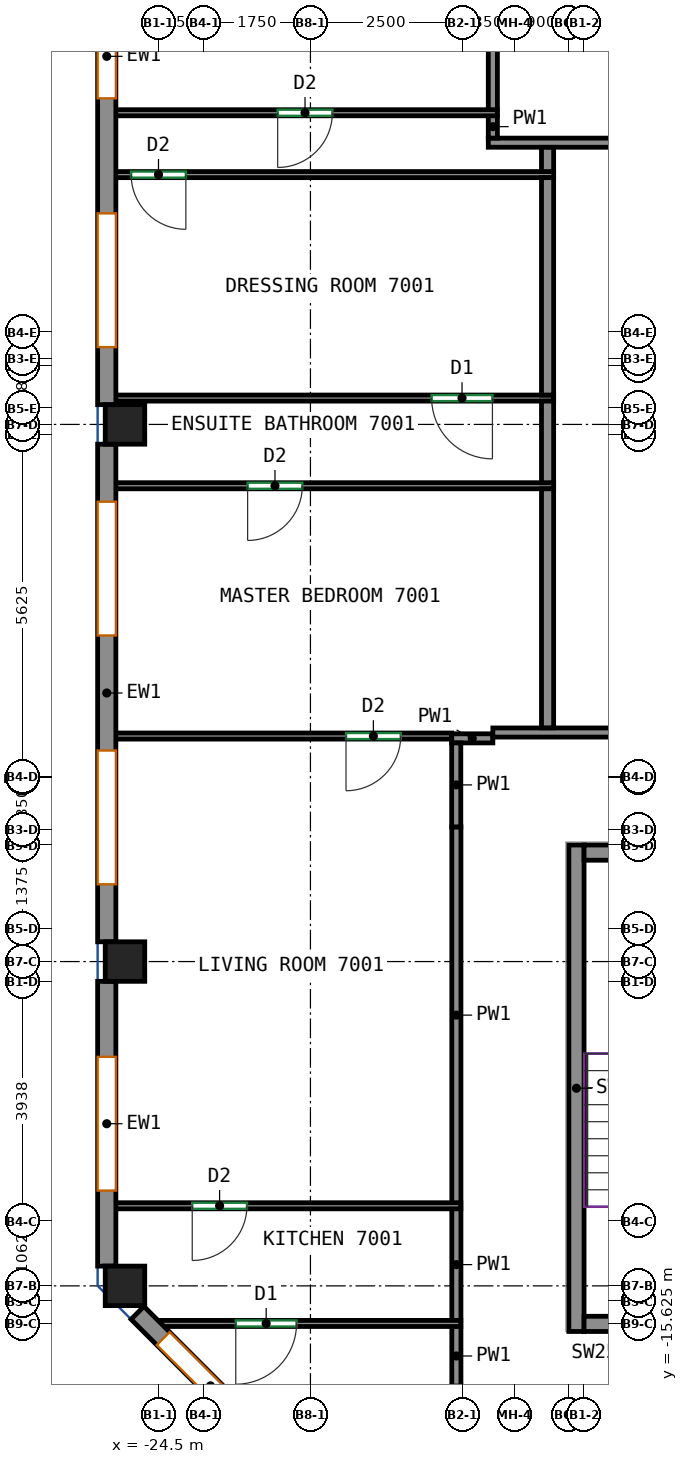
"""IFC4 building model, lengths in metres.
Left out: names, types, materials, properties, quantities, classifications, styles, units other than length and angle.
Written with IfcOpenShell. Run it as: python <this file> out.ifc"""

import sys

from ifc_helpers import new_model, si_unit, direction, frame, frame_2d, origin, origin_2d, place, context, subcontext, project, spatial, rectangle, extrude, source, transform, mapped, element, fill, save


model = new_model("IFC4")
c1 = context("Model", 3, precision=1e-05, world=origin(), true_north=direction((0.0, 1.0)))
c2 = subcontext(c1, "Body", "Model", "MODEL_VIEW")
j1 = project(units=[si_unit("LENGTHUNIT", "METRE"), si_unit("PLANEANGLEUNIT", "RADIAN")], contexts=[c1])
p1 = place(None, origin())
s1 = spatial("IfcSite", under=j1, at=p1, CompositionType="ELEMENT")
p2 = place(p1, origin())
s2 = spatial("IfcBuilding", under=s1, at=p2, CompositionType="ELEMENT")
p3 = place(p2, frame((0.0, 0.0, 284.0)))
s3 = spatial("IfcBuildingStorey", under=s2, at=p3, CompositionType="ELEMENT", Elevation=284.0)
m1 = source(origin(), c2, "Body", "SweptSolid", [
    extrude(rectangle(XDim=0.65, YDim=0.65, at=origin_2d()), origin(), (0.0, 0.0, 1.0), 3.12),
])
for number, where, z_axis, x_axis in (
    (1, (-25.05, -15.0, 0.0), (0.0, 0.0, 1.0), (1.0, 0.0, 0.0)),
    (2, (-25.05, -9.667, 0.0), (0.0, 0.0, 1.0), (1.0, 0.0, 0.0)),
    (3, (-25.05, -0.833, 0.0), (0.0, 0.0, 1.0), (1.0, 0.0, 0.0)),
):
    element("IfcColumn", number, at=place(p3, frame(where, z_axis=z_axis, x_axis=x_axis)), inside=s3, PredefinedType="COLUMN", context=c2, shape_type="MappedRepresentation", body=[
        mapped(m1, transform((0.0, 0.0, 0.0))),
    ])
m2 = source(origin(), c2, "Body", "SweptSolid", [
    extrude(rectangle(XDim=8.0, YDim=0.25, at=frame_2d((4.0, 0.0))), origin(), (0.0, 0.0, 1.0), 3.12),
])
p4 = place(p3, frame((-17.625, -15.75, 0.0), z_axis=(0.0, 0.0, 1.0), x_axis=(0.0, 1.0, 0.0)))
e4 = element("IfcWall", 4, at=p4, inside=s3, PredefinedType="SHEAR", context=c2, shape_type="MappedRepresentation", body=[
    mapped(m2, transform((0.0, 0.0, 0.0))),
])
m3 = source(origin(), c2, "Body", "SweptSolid", [
    extrude(rectangle(XDim=3.7, YDim=0.25, at=frame_2d((1.85, 0.0))), origin(), (0.0, 0.0, 1.0), 3.12),
])
p5 = place(p3, frame((-17.5, -15.625, 0.0), z_axis=(0.0, 0.0, 1.0), x_axis=(1.0, 0.0, 0.0)))
e5 = element("IfcWall", 5, at=p5, inside=s3, PredefinedType="SHEAR", context=c2, shape_type="MappedRepresentation", body=[
    mapped(m3, transform((0.0, 0.0, 0.0))),
])
p6 = place(p5, frame((1.25, 0.0, 0.0)))
e6 = element("IfcOpeningElement", 6, at=p6, cuts=e5, PredefinedType="OPENING", context=c2, shape_type="SweptSolid", body=[
    extrude(rectangle(XDim=1.2, YDim=2.1, at=frame_2d((0.6, 1.05))), frame((0.0, 0.135, 0.0), z_axis=(0.0, -1.0, 0.0), x_axis=(1.0, 0.0, 0.0)), (0.0, 0.0, 1.0), 0.27),
])
p7 = place(p3, frame((-17.5, -7.875, 0.0), z_axis=(0.0, 0.0, 1.0), x_axis=(1.0, 0.0, 0.0)))
e7 = element("IfcWall", 7, at=p7, inside=s3, PredefinedType="SHEAR", context=c2, shape_type="MappedRepresentation", body=[
    mapped(m3, transform((0.0, 0.0, 0.0))),
])
m4 = source(origin(), c2, "Body", "SweptSolid", [
    extrude(rectangle(XDim=8.183, YDim=0.3, at=frame_2d((4.092, 0.0))), origin(), (0.0, 0.0, 1.0), 3.12),
])
p8 = place(p3, frame((-25.35, 7.675, 0.0), z_axis=(0.0, 0.0, 1.0), x_axis=(0.0, -1.0, 0.0)))
e8 = element("IfcWall", 8, at=p8, inside=s3, PredefinedType="SOLIDWALL", context=c2, shape_type="MappedRepresentation", body=[
    mapped(m4, transform((0.0, 0.0, 0.0))),
])
p9 = place(p8, frame((0.946, 0.0, 0.8)))
e9 = element("IfcOpeningElement", 9, at=p9, cuts=e8, PredefinedType="OPENING", context=c2, shape_type="SweptSolid", body=[
    extrude(rectangle(XDim=2.2, YDim=2.05, at=frame_2d((1.1, 1.025))), frame((0.0, 0.16, 0.0), z_axis=(0.0, -1.0, 0.0), x_axis=(1.0, 0.0, 0.0)), (0.0, 0.0, 1.0), 0.32),
])
p10 = place(p8, frame((5.037, 0.0, 0.8)))
e10 = element("IfcOpeningElement", 10, at=p10, cuts=e8, PredefinedType="OPENING", context=c2, shape_type="SweptSolid", body=[
    extrude(rectangle(XDim=2.2, YDim=2.05, at=frame_2d((1.1, 1.025))), frame((0.0, 0.16, 0.0), z_axis=(0.0, -1.0, 0.0), x_axis=(1.0, 0.0, 0.0)), (0.0, 0.0, 1.0), 0.32),
])
m5 = source(origin(), c2, "Body", "SweptSolid", [
    extrude(rectangle(XDim=8.184, YDim=0.3, at=frame_2d((4.092, 0.0))), origin(), (0.0, 0.0, 1.0), 3.12),
])
p11 = place(p3, frame((-25.35, -1.158, 0.0), z_axis=(0.0, 0.0, 1.0), x_axis=(0.0, -1.0, 0.0)))
e11 = element("IfcWall", 11, at=p11, inside=s3, PredefinedType="SOLIDWALL", context=c2, shape_type="MappedRepresentation", body=[
    mapped(m5, transform((0.0, 0.0, 0.0))),
])
p12 = place(p11, frame((0.946, 0.0, 0.8)))
e12 = element("IfcOpeningElement", 12, at=p12, cuts=e11, PredefinedType="OPENING", context=c2, shape_type="SweptSolid", body=[
    extrude(rectangle(XDim=2.2, YDim=2.05, at=frame_2d((1.1, 1.025))), frame((0.0, 0.16, 0.0), z_axis=(0.0, -1.0, 0.0), x_axis=(1.0, 0.0, 0.0)), (0.0, 0.0, 1.0), 0.32),
])
p13 = place(p11, frame((5.038, 0.0, 0.8)))
e13 = element("IfcOpeningElement", 13, at=p13, cuts=e11, PredefinedType="OPENING", context=c2, shape_type="SweptSolid", body=[
    extrude(rectangle(XDim=2.2, YDim=2.05, at=frame_2d((1.1, 1.025))), frame((0.0, 0.16, 0.0), z_axis=(0.0, -1.0, 0.0), x_axis=(1.0, 0.0, 0.0)), (0.0, 0.0, 1.0), 0.32),
])
m6 = source(origin(), c2, "Body", "SweptSolid", [
    extrude(rectangle(XDim=4.683, YDim=0.3, at=frame_2d((2.342, 0.0))), origin(), (0.0, 0.0, 1.0), 3.12),
])
p14 = place(p3, frame((-25.35, -9.992, 0.0), z_axis=(0.0, 0.0, 1.0), x_axis=(0.0, -1.0, 0.0)))
e14 = element("IfcWall", 14, at=p14, inside=s3, PredefinedType="SOLIDWALL", context=c2, shape_type="MappedRepresentation", body=[
    mapped(m6, transform((0.0, 0.0, 0.0))),
])
p15 = place(p14, frame((1.242, 0.0, 0.8)))
e15 = element("IfcOpeningElement", 15, at=p15, cuts=e14, PredefinedType="OPENING", context=c2, shape_type="SweptSolid", body=[
    extrude(rectangle(XDim=2.2, YDim=2.05, at=frame_2d((1.1, 1.025))), frame((0.0, 0.16, 0.0), z_axis=(0.0, -1.0, 0.0), x_axis=(1.0, 0.0, 0.0)), (0.0, 0.0, 1.0), 0.32),
])
m7 = source(origin(), c2, "Body", "SweptSolid", [
    extrude(rectangle(XDim=3.394, YDim=0.3, at=frame_2d((1.697, 0.0))), origin(), (0.0, 0.0, 1.0), 3.12),
])
p16 = place(p3, frame((-24.844, -15.444, 0.0), z_axis=(0.0, 0.0, 1.0), x_axis=(0.707070815327, -0.707142745217, 0.0)))
e16 = element("IfcWall", 16, at=p16, inside=s3, PredefinedType="SOLIDWALL", context=c2, shape_type="MappedRepresentation", body=[
    mapped(m7, transform((0.0, 0.0, 0.0))),
])
p17 = place(p16, frame((0.597, 0.0, 0.8)))
e17 = element("IfcOpeningElement", 17, at=p17, cuts=e16, PredefinedType="OPENING", context=c2, shape_type="SweptSolid", body=[
    extrude(rectangle(XDim=2.2, YDim=2.05, at=frame_2d((1.1, 1.025))), frame((0.0, 0.16, 0.0), z_axis=(0.0, -1.0, 0.0), x_axis=(1.0, 0.0, 0.0)), (0.0, 0.0, 1.0), 0.32),
])
p18 = place(p3, frame((-19.6, -16.648, 0.0), z_axis=(0.0, 0.0, 1.0), x_axis=(0.0, 1.0, 0.0)))
e18 = element("IfcWall", 18, at=p18, inside=s3, PredefinedType="PARTITIONING", context=c2, shape_type="SweptSolid", body=[
    extrude(rectangle(XDim=0.99, YDim=0.15, at=frame_2d((0.495, 0.0))), origin(), (0.0, 0.0, 1.0), 3.12),
])
p19 = place(p3, frame((-19.6, -15.578, 0.0), z_axis=(0.0, 0.0, 1.0), x_axis=(0.0, 1.0, 0.0)))
e19 = element("IfcWall", 19, at=p19, inside=s3, PredefinedType="PARTITIONING", context=c2, shape_type="SweptSolid", body=[
    extrude(rectangle(XDim=1.855, YDim=0.15, at=frame_2d((0.927, 0.0))), origin(), (0.0, 0.0, 1.0), 3.12),
])
p20 = place(p3, frame((-19.0, -5.996, 0.0), z_axis=(0.0, 0.0, 1.0), x_axis=(-1.0, 0.0, 0.0)))
e20 = element("IfcWall", 20, at=p20, inside=s3, PredefinedType="PARTITIONING", context=c2, shape_type="SweptSolid", body=[
    extrude(rectangle(XDim=0.677, YDim=0.15, at=frame_2d((0.338, 0.0))), origin(), (0.0, 0.0, 1.0), 3.12),
])
p21 = place(p3, frame((-19.6, -13.643, 0.0), z_axis=(0.0, 0.0, 1.0), x_axis=(0.0, 1.0, 0.0)))
e21 = element("IfcWall", 21, at=p21, inside=s3, PredefinedType="PARTITIONING", context=c2, shape_type="SweptSolid", body=[
    extrude(rectangle(XDim=6.191, YDim=0.15, at=frame_2d((3.096, 0.0))), origin(), (0.0, 0.0, 1.0), 3.12),
])
p22 = place(p3, frame((-19.602, -7.452, 0.0), z_axis=(0.0, 0.0, 1.0), x_axis=(0.0, 1.0, 0.0)))
e22 = element("IfcWall", 22, at=p22, inside=s3, PredefinedType="PARTITIONING", context=c2, shape_type="SweptSolid", body=[
    extrude(rectangle(XDim=1.381, YDim=0.15, at=frame_2d((0.69, 0.0))), origin(), (0.0, 0.0, 1.0), 3.12),
])
p23 = place(p3, frame((-19.0, -5.9, 0.0), z_axis=(0.0, 0.0, 1.0), x_axis=(1.0, 0.0, 0.0)))
e23 = element("IfcWall", 23, at=p23, inside=s3, PredefinedType="PARTITIONING", context=c2, shape_type="SweptSolid", body=[
    extrude(rectangle(XDim=25.655, YDim=0.15, at=frame_2d((12.828, 0.0))), origin(), (0.0, 0.0, 1.0), 3.12),
])
p24 = place(p23, frame((4.394, 0.0, 0.0)))
e24 = element("IfcOpeningElement", 24, at=p24, cuts=e23, PredefinedType="OPENING", context=c2, shape_type="SweptSolid", body=[
    extrude(rectangle(XDim=0.9, YDim=2.1, at=frame_2d((0.45, 1.05))), frame((0.0, 0.085, 0.0), z_axis=(0.0, -1.0, 0.0), x_axis=(1.0, 0.0, 0.0)), (0.0, 0.0, 1.0), 0.17),
])
p25 = place(p3, frame((-19.075, 3.8, 0.0), z_axis=(0.0, 0.0, 1.0), x_axis=(1.0, 0.0, 0.0)))
e25 = element("IfcWall", 25, at=p25, inside=s3, PredefinedType="PARTITIONING", context=c2, shape_type="SweptSolid", body=[
    extrude(rectangle(XDim=4.89, YDim=0.15, at=frame_2d((2.445, 0.0))), origin(), (0.0, 0.0, 1.0), 3.12),
])
p26 = place(p3, frame((-19.0, 3.875, 0.0), z_axis=(0.0, 0.0, 1.0), x_axis=(0.0, 1.0, 0.0)))
e26 = element("IfcWall", 26, at=p26, inside=s3, PredefinedType="PARTITIONING", context=c2, shape_type="SweptSolid", body=[
    extrude(rectangle(XDim=0.377, YDim=0.15, at=frame_2d((0.188, 0.0))), origin(), (0.0, 0.0, 1.0), 3.12),
])
p27 = place(p3, frame((-19.0, 4.332, 0.0), z_axis=(0.0, 0.0, 1.0), x_axis=(0.0, 1.0, 0.0)))
e27 = element("IfcWall", 27, at=p27, inside=s3, PredefinedType="PARTITIONING", context=c2, shape_type="SweptSolid", body=[
    extrude(rectangle(XDim=3.578, YDim=0.15, at=frame_2d((1.789, 0.0))), origin(), (0.0, 0.0, 1.0), 3.12),
])
p28 = place(p3, frame((-19.527, -15.618, 0.0), z_axis=(0.0, 0.0, 1.0), x_axis=(-1.0, 0.0, 0.0)))
e28 = element("IfcWall", 28, at=p28, inside=s3, PredefinedType="PARTITIONING", context=c2, shape_type="SweptSolid", body=[
    extrude(rectangle(XDim=5.001, YDim=0.1, at=frame_2d((2.5, 0.0))), origin(), (0.0, 0.0, 1.0), 3.12),
])
p29 = place(p28, frame((2.701, 0.0, 0.0)))
e29 = element("IfcOpeningElement", 29, at=p29, cuts=e28, PredefinedType="OPENING", context=c2, shape_type="SweptSolid", body=[
    extrude(rectangle(XDim=1.0, YDim=2.1, at=frame_2d((0.5, 1.05))), frame((0.0, 0.06, 0.0), z_axis=(0.0, -1.0, 0.0), x_axis=(1.0, 0.0, 0.0)), (0.0, 0.0, 1.0), 0.12),
])
p30 = place(p3, frame((-19.527, -13.683, 0.0), z_axis=(0.0, 0.0, 1.0), x_axis=(-1.0, 0.0, 0.0)))
e30 = element("IfcWall", 30, at=p30, inside=s3, PredefinedType="PARTITIONING", context=c2, shape_type="SweptSolid", body=[
    extrude(rectangle(XDim=5.723, YDim=0.1, at=frame_2d((2.861, 0.0))), origin(), (0.0, 0.0, 1.0), 3.12),
])
p31 = place(p30, frame((3.517, 0.0, 0.0)))
e31 = element("IfcOpeningElement", 31, at=p31, cuts=e30, PredefinedType="OPENING", context=c2, shape_type="SweptSolid", body=[
    extrude(rectangle(XDim=0.9, YDim=2.1, at=frame_2d((0.45, 1.05))), frame((0.0, 0.06, 0.0), z_axis=(0.0, -1.0, 0.0), x_axis=(1.0, 0.0, 0.0)), (0.0, 0.0, 1.0), 0.12),
])
p32 = place(p3, frame((-19.677, -5.958, 0.0), z_axis=(0.0, 0.0, 1.0), x_axis=(-1.0, 0.0, 0.0)))
e32 = element("IfcWall", 32, at=p32, inside=s3, PredefinedType="PARTITIONING", context=c2, shape_type="SweptSolid", body=[
    extrude(rectangle(XDim=5.573, YDim=0.1, at=frame_2d((2.787, 0.0))), origin(), (0.0, 0.0, 1.0), 3.12),
])
p33 = place(p32, frame((0.838, 0.0, 0.0)))
e33 = element("IfcOpeningElement", 33, at=p33, cuts=e32, PredefinedType="OPENING", context=c2, shape_type="SweptSolid", body=[
    extrude(rectangle(XDim=0.9, YDim=2.1, at=frame_2d((0.45, 1.05))), frame((0.0, 0.06, 0.0), z_axis=(0.0, -1.0, 0.0), x_axis=(1.0, 0.0, 0.0)), (0.0, 0.0, 1.0), 0.12),
])
p34 = place(p3, frame((-18.0, -1.842, 0.0), z_axis=(0.0, 0.0, 1.0), x_axis=(-1.0, 0.0, 0.0)))
e34 = element("IfcWall", 34, at=p34, inside=s3, PredefinedType="PARTITIONING", context=c2, shape_type="SweptSolid", body=[
    extrude(rectangle(XDim=7.25, YDim=0.1, at=frame_2d((3.625, 0.0))), origin(), (0.0, 0.0, 1.0), 3.12),
])
p35 = place(p34, frame((4.133, 0.0, 0.0)))
e35 = element("IfcOpeningElement", 35, at=p35, cuts=e34, PredefinedType="OPENING", context=c2, shape_type="SweptSolid", body=[
    extrude(rectangle(XDim=0.9, YDim=2.1, at=frame_2d((0.45, 1.05))), frame((0.0, 0.06, 0.0), z_axis=(0.0, -1.0, 0.0), x_axis=(1.0, 0.0, 0.0)), (0.0, 0.0, 1.0), 0.12),
])
p36 = place(p3, frame((-18.1, -5.823, 0.0), z_axis=(0.0, 0.0, 1.0), x_axis=(0.0, 1.0, 0.0)))
e36 = element("IfcWall", 36, at=p36, inside=s3, PredefinedType="PARTITIONING", context=c2, shape_type="SweptSolid", body=[
    extrude(rectangle(XDim=3.931, YDim=0.2, at=frame_2d((1.965, 0.0))), origin(), (0.0, 0.0, 1.0), 3.12),
])
p37 = place(p3, frame((-18.0, -0.4, 0.0), z_axis=(0.0, 0.0, 1.0), x_axis=(-1.0, 0.0, 0.0)))
e37 = element("IfcWall", 37, at=p37, inside=s3, PredefinedType="PARTITIONING", context=c2, shape_type="SweptSolid", body=[
    extrude(rectangle(XDim=7.25, YDim=0.1, at=frame_2d((3.625, 0.0))), origin(), (0.0, 0.0, 1.0), 3.12),
])
p38 = place(p37, frame((1.007, 0.0, 0.0)))
e38 = element("IfcOpeningElement", 38, at=p38, cuts=e37, PredefinedType="OPENING", context=c2, shape_type="SweptSolid", body=[
    extrude(rectangle(XDim=1.0, YDim=2.1, at=frame_2d((0.5, 1.05))), frame((0.0, 0.06, 0.0), z_axis=(0.0, -1.0, 0.0), x_axis=(1.0, 0.0, 0.0)), (0.0, 0.0, 1.0), 0.12),
])
p39 = place(p3, frame((-18.1, -1.792, 0.0), z_axis=(0.0, 0.0, 1.0), x_axis=(0.0, 1.0, 0.0)))
e39 = element("IfcWall", 39, at=p39, inside=s3, PredefinedType="PARTITIONING", context=c2, shape_type="SweptSolid", body=[
    extrude(rectangle(XDim=1.342, YDim=0.2, at=frame_2d((0.671, 0.0))), origin(), (0.0, 0.0, 1.0), 3.12),
])
p40 = place(p3, frame((-18.0, 3.275, 0.0), z_axis=(0.0, 0.0, 1.0), x_axis=(-1.0, 0.0, 0.0)))
e40 = element("IfcWall", 40, at=p40, inside=s3, PredefinedType="PARTITIONING", context=c2, shape_type="SweptSolid", body=[
    extrude(rectangle(XDim=7.25, YDim=0.1, at=frame_2d((3.625, 0.0))), origin(), (0.0, 0.0, 1.0), 3.12),
])
p41 = place(p40, frame((6.049, 0.0, 0.0)))
e41 = element("IfcOpeningElement", 41, at=p41, cuts=e40, PredefinedType="OPENING", context=c2, shape_type="SweptSolid", body=[
    extrude(rectangle(XDim=0.9, YDim=2.1, at=frame_2d((0.45, 1.05))), frame((0.0, 0.06, 0.0), z_axis=(0.0, -1.0, 0.0), x_axis=(1.0, 0.0, 0.0)), (0.0, 0.0, 1.0), 0.12),
])
p42 = place(p3, frame((-18.1, -0.35, 0.0), z_axis=(0.0, 0.0, 1.0), x_axis=(0.0, 1.0, 0.0)))
e42 = element("IfcWall", 42, at=p42, inside=s3, PredefinedType="PARTITIONING", context=c2, shape_type="SweptSolid", body=[
    extrude(rectangle(XDim=3.575, YDim=0.2, at=frame_2d((1.788, 0.0))), origin(), (0.0, 0.0, 1.0), 3.12),
])
p43 = place(p3, frame((-18.927, 4.292, 0.0), z_axis=(0.0, 0.0, 1.0), x_axis=(-1.0, 0.0, 0.0)))
e43 = element("IfcWall", 43, at=p43, inside=s3, PredefinedType="PARTITIONING", context=c2, shape_type="SweptSolid", body=[
    extrude(rectangle(XDim=6.323, YDim=0.1, at=frame_2d((3.162, 0.0))), origin(), (0.0, 0.0, 1.0), 3.12),
])
p44 = place(p43, frame((2.712, 0.0, 0.0)))
e44 = element("IfcOpeningElement", 44, at=p44, cuts=e43, PredefinedType="OPENING", context=c2, shape_type="SweptSolid", body=[
    extrude(rectangle(XDim=0.9, YDim=2.1, at=frame_2d((0.45, 1.05))), frame((0.0, 0.06, 0.0), z_axis=(0.0, -1.0, 0.0), x_axis=(1.0, 0.0, 0.0)), (0.0, 0.0, 1.0), 0.12),
])
p45 = place(p3, frame((-18.1, 3.325, 0.0), z_axis=(0.0, 0.0, 1.0), x_axis=(0.0, 1.0, 0.0)))
e45 = element("IfcWall", 45, at=p45, inside=s3, PredefinedType="PARTITIONING", context=c2, shape_type="SweptSolid", body=[
    extrude(rectangle(XDim=0.398, YDim=0.2, at=frame_2d((0.199, 0.0))), origin(), (0.0, 0.0, 1.0), 3.12),
])
p46 = place(p9, origin())
e46 = element("IfcWindow", 46, at=p46, inside=s3, PartitioningType="SINGLE_PANEL", PredefinedType="WINDOW", context=c2, shape_type="SweptSolid", body=[
    extrude(rectangle(XDim=2.2, YDim=2.05, at=frame_2d((1.1, 1.025))), frame((0.0, 0.03, 0.0), z_axis=(0.0, -1.0, 0.0), x_axis=(1.0, 0.0, 0.0)), (0.0, 0.0, 1.0), 0.06),
])
fill(e9, e46)
p47 = place(p10, origin())
e47 = element("IfcWindow", 47, at=p47, inside=s3, PartitioningType="SINGLE_PANEL", PredefinedType="WINDOW", context=c2, shape_type="SweptSolid", body=[
    extrude(rectangle(XDim=2.2, YDim=2.05, at=frame_2d((1.1, 1.025))), frame((0.0, 0.03, 0.0), z_axis=(0.0, -1.0, 0.0), x_axis=(1.0, 0.0, 0.0)), (0.0, 0.0, 1.0), 0.06),
])
fill(e10, e47)
p48 = place(p12, origin())
e48 = element("IfcWindow", 48, at=p48, inside=s3, PartitioningType="SINGLE_PANEL", PredefinedType="WINDOW", context=c2, shape_type="SweptSolid", body=[
    extrude(rectangle(XDim=2.2, YDim=2.05, at=frame_2d((1.1, 1.025))), frame((0.0, 0.03, 0.0), z_axis=(0.0, -1.0, 0.0), x_axis=(1.0, 0.0, 0.0)), (0.0, 0.0, 1.0), 0.06),
])
fill(e12, e48)
p49 = place(p13, origin())
e49 = element("IfcWindow", 49, at=p49, inside=s3, PartitioningType="SINGLE_PANEL", PredefinedType="WINDOW", context=c2, shape_type="SweptSolid", body=[
    extrude(rectangle(XDim=2.2, YDim=2.05, at=frame_2d((1.1, 1.025))), frame((0.0, 0.03, 0.0), z_axis=(0.0, -1.0, 0.0), x_axis=(1.0, 0.0, 0.0)), (0.0, 0.0, 1.0), 0.06),
])
fill(e13, e49)
p50 = place(p15, origin())
e50 = element("IfcWindow", 50, at=p50, inside=s3, PartitioningType="SINGLE_PANEL", PredefinedType="WINDOW", context=c2, shape_type="SweptSolid", body=[
    extrude(rectangle(XDim=2.2, YDim=2.05, at=frame_2d((1.1, 1.025))), frame((0.0, 0.03, 0.0), z_axis=(0.0, -1.0, 0.0), x_axis=(1.0, 0.0, 0.0)), (0.0, 0.0, 1.0), 0.06),
])
fill(e15, e50)
p51 = place(p17, origin())
e51 = element("IfcWindow", 51, at=p51, inside=s3, PartitioningType="SINGLE_PANEL", PredefinedType="WINDOW", context=c2, shape_type="SweptSolid", body=[
    extrude(rectangle(XDim=2.2, YDim=2.05, at=frame_2d((1.1, 1.025))), frame((0.0, 0.03, 0.0), z_axis=(0.0, -1.0, 0.0), x_axis=(1.0, 0.0, 0.0)), (0.0, 0.0, 1.0), 0.06),
])
fill(e17, e51)
p52 = place(p29, origin())
e52 = element("IfcDoor", 52, at=p52, inside=s3, OperationType="SINGLE_SWING_RIGHT", PredefinedType="DOOR", context=c2, shape_type="SweptSolid", body=[
    extrude(rectangle(XDim=1.0, YDim=2.1, at=frame_2d((0.5, 1.05))), frame((0.0, 0.025, 0.0), z_axis=(0.0, -1.0, 0.0), x_axis=(1.0, 0.0, 0.0)), (0.0, 0.0, 1.0), 0.05),
])
fill(e29, e52)
p53 = place(p31, origin())
e53 = element("IfcDoor", 53, at=p53, inside=s3, OperationType="SINGLE_SWING_RIGHT", PredefinedType="DOOR", context=c2, shape_type="SweptSolid", body=[
    extrude(rectangle(XDim=0.9, YDim=2.1, at=frame_2d((0.45, 1.05))), frame((0.0, 0.025, 0.0), z_axis=(0.0, -1.0, 0.0), x_axis=(1.0, 0.0, 0.0)), (0.0, 0.0, 1.0), 0.05),
])
fill(e31, e53)
p54 = place(p33, origin())
e54 = element("IfcDoor", 54, at=p54, inside=s3, OperationType="SINGLE_SWING_RIGHT", PredefinedType="DOOR", context=c2, shape_type="SweptSolid", body=[
    extrude(rectangle(XDim=0.9, YDim=2.1, at=frame_2d((0.45, 1.05))), frame((0.0, 0.025, 0.0), z_axis=(0.0, -1.0, 0.0), x_axis=(1.0, 0.0, 0.0)), (0.0, 0.0, 1.0), 0.05),
])
fill(e33, e54)
p55 = place(p35, origin())
e55 = element("IfcDoor", 55, at=p55, inside=s3, OperationType="SINGLE_SWING_RIGHT", PredefinedType="DOOR", context=c2, shape_type="SweptSolid", body=[
    extrude(rectangle(XDim=0.9, YDim=2.1, at=frame_2d((0.45, 1.05))), frame((0.0, 0.025, 0.0), z_axis=(0.0, -1.0, 0.0), x_axis=(1.0, 0.0, 0.0)), (0.0, 0.0, 1.0), 0.05),
])
fill(e35, e55)
p56 = place(p38, origin())
e56 = element("IfcDoor", 56, at=p56, inside=s3, OperationType="SINGLE_SWING_LEFT", PredefinedType="DOOR", context=c2, shape_type="SweptSolid", body=[
    extrude(rectangle(XDim=1.0, YDim=2.1, at=frame_2d((0.5, 1.05))), frame((0.0, 0.025, 0.0), z_axis=(0.0, -1.0, 0.0), x_axis=(1.0, 0.0, 0.0)), (0.0, 0.0, 1.0), 0.05),
])
fill(e38, e56)
p57 = place(p41, origin())
e57 = element("IfcDoor", 57, at=p57, inside=s3, OperationType="SINGLE_SWING_LEFT", PredefinedType="DOOR", context=c2, shape_type="SweptSolid", body=[
    extrude(rectangle(XDim=0.9, YDim=2.1, at=frame_2d((0.45, 1.05))), frame((0.0, 0.025, 0.0), z_axis=(0.0, -1.0, 0.0), x_axis=(1.0, 0.0, 0.0)), (0.0, 0.0, 1.0), 0.05),
])
fill(e41, e57)
p58 = place(p44, origin())
e58 = element("IfcDoor", 58, at=p58, inside=s3, OperationType="SINGLE_SWING_RIGHT", PredefinedType="DOOR", context=c2, shape_type="SweptSolid", body=[
    extrude(rectangle(XDim=0.9, YDim=2.1, at=frame_2d((0.45, 1.05))), frame((0.0, 0.025, 0.0), z_axis=(0.0, -1.0, 0.0), x_axis=(1.0, 0.0, 0.0)), (0.0, 0.0, 1.0), 0.05),
])
fill(e44, e58)
save(model, sys.argv[1])
